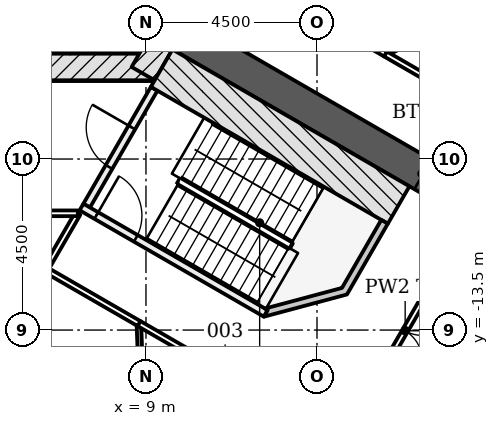
"""IFC4 building model, lengths in metres.
Left out: names, types, materials, properties, quantities, classifications, styles, units other than length and angle.
Written with IfcOpenShell. Run it as: python <this file> out.ifc"""

import sys

from ifc_helpers import new_model, si_unit, direction, frame, frame_2d, origin, place, context, subcontext, project, spatial, polyline, rectangle, outline, extrude, element, fill, save


model = new_model("IFC4")
c1 = context("Model", 3, precision=1e-05, world=origin(), true_north=direction((0.0, 1.0)))
c2 = subcontext(c1, "Body", "Model", "MODEL_VIEW")
j1 = project(units=[si_unit("LENGTHUNIT", "METRE"), si_unit("PLANEANGLEUNIT", "RADIAN")], contexts=[c1])
p1 = place(None, origin())
s1 = spatial("IfcSite", under=j1, at=p1, CompositionType="ELEMENT")
p2 = place(p1, origin())
s2 = spatial("IfcBuilding", under=s1, at=p2, CompositionType="ELEMENT")
p3 = place(p2, frame((0.0, 0.0, -9.0)))
s3 = spatial("IfcBuildingStorey", under=s2, at=p3, CompositionType="ELEMENT", Elevation=-9.0)
p4 = place(p3, frame((-9.229, -6.578, -0.3), z_axis=(0.0, 0.0, 1.0), x_axis=(1.0, 0.0, 0.0)))
e1 = element("IfcWall", 1, at=p4, inside=s3, PredefinedType="SHEAR", context=c2, shape_type="SweptSolid", body=[
    extrude(rectangle(XDim=18.458, YDim=0.7, at=frame_2d((9.229, 0.0))), origin(), (0.0, 0.0, 1.0), 4.5),
])
p5 = place(p3, frame((8.926, -6.753, -0.3), z_axis=(0.0, 0.0, 1.0), x_axis=(0.500042739161, 0.866000726912, 0.0)))
e2 = element("IfcWall", 2, at=p5, inside=s3, PredefinedType="SHEAR", context=c2, shape_type="SweptSolid", body=[
    extrude(rectangle(XDim=2.771, YDim=0.7, at=frame_2d((1.386, 0.0))), origin(), (0.0, 0.0, 1.0), 4.5),
])
p6 = place(p3, frame((9.922, -5.728, -0.3), z_axis=(0.0, 0.0, 1.0), x_axis=(0.866028046028, -0.499995423472, 0.0)))
e3 = element("IfcWall", 3, at=p6, inside=s3, PredefinedType="SHEAR", context=c2, shape_type="SweptSolid", body=[
    extrude(rectangle(XDim=14.633, YDim=0.9, at=frame_2d((7.316, 0.0))), origin(), (0.0, 0.0, 1.0), 4.5),
])
p7 = place(p6, frame((7.35, 0.0, 0.3)))
e4 = element("IfcOpeningElement", 4, at=p7, cuts=e3, PredefinedType="OPENING", context=c2, shape_type="SweptSolid", body=[
    extrude(rectangle(XDim=1.5, YDim=2.1, at=frame_2d((0.75, 1.05))), frame((0.0, 0.46, 0.0), z_axis=(0.0, -1.0, 0.0), x_axis=(1.0, 0.0, 0.0)), (0.0, 0.0, 1.0), 0.92),
])
p8 = place(p3, frame((7.07, -6.189, 0.0), z_axis=(0.0, 0.0, 1.0), x_axis=(-0.499997568964, 0.866026807339, 0.0)))
e5 = element("IfcWall", 5, at=p8, inside=s3, PredefinedType="PARTITIONING", context=c2, shape_type="SweptSolid", body=[
    extrude(rectangle(XDim=8.091, YDim=0.15, at=frame_2d((4.046, 0.0))), origin(), (0.0, 0.0, 1.0), 4.2),
])
p9 = place(p3, frame((7.44, -10.226, -0.3), z_axis=(0.0, 0.0, 1.0), x_axis=(0.500022077904, 0.866012656725, 0.0)))
e6 = element("IfcWall", 6, at=p9, inside=s3, PredefinedType="SHEAR", context=c2, shape_type="SweptSolid", body=[
    extrude(rectangle(XDim=3.55, YDim=0.2, at=frame_2d((1.775, 0.0))), origin(), (0.0, 0.0, 1.0), 4.5),
])
p10 = place(p9, frame((1.175, 0.0, 0.3)))
e7 = element("IfcOpeningElement", 7, at=p10, cuts=e6, PredefinedType="OPENING", context=c2, shape_type="SweptSolid", body=[
    extrude(rectangle(XDim=1.2, YDim=2.1, at=frame_2d((0.6, 1.05))), frame((0.0, 0.11, 0.0), z_axis=(0.0, -1.0, 0.0), x_axis=(1.0, 0.0, 0.0)), (0.0, 0.0, 1.0), 0.22),
])
p11 = place(p3, frame((7.304, -10.262, -0.3), z_axis=(0.0, 0.0, 1.0), x_axis=(0.866026594901, -0.49999793692, 0.0)))
e8 = element("IfcWall", 8, at=p11, inside=s3, PredefinedType="SHEAR", context=c2, shape_type="SweptSolid", body=[
    extrude(rectangle(XDim=5.6, YDim=0.2, at=frame_2d((2.8, 0.0))), origin(), (0.0, 0.0, 1.0), 4.5),
])
p12 = place(p11, frame((0.45, 0.0, 0.3)))
e9 = element("IfcOpeningElement", 9, at=p12, cuts=e8, PredefinedType="OPENING", context=c2, shape_type="SweptSolid", body=[
    extrude(rectangle(XDim=1.2, YDim=2.1, at=frame_2d((0.6, 1.05))), frame((0.0, 0.11, 0.0), z_axis=(0.0, -1.0, 0.0), x_axis=(1.0, 0.0, 0.0)), (0.0, 0.0, 1.0), 0.22),
])
p13 = place(p3, frame((9.413, -6.61, -0.3), z_axis=(0.0, 0.0, 1.0), x_axis=(0.866018442252, -0.500012057535, 0.0)))
e10 = element("IfcWall", 10, at=p13, inside=s3, PredefinedType="SHEAR", context=c2, shape_type="SweptSolid", body=[
    extrude(rectangle(XDim=7.2, YDim=1.136, at=frame_2d((3.6, 0.0))), origin(), (0.0, 0.0, 1.0), 4.5),
])
p14 = place(p3, frame((0.0, 0.0, -0.3)))
e11 = element("IfcWall", 11, at=p14, inside=s3, PredefinedType="SHEAR", context=c2, shape_type="SweptSolid", body=[
    extrude(outline(polyline([(12.104, -13.149), (14.289, -12.563), (15.364, -10.701), (15.191, -10.601), (14.157, -12.392), (12.132, -12.934), (12.204, -12.976), (12.204, -12.976), (12.204, -12.976), (12.204, -12.976), (12.204, -12.976), (12.204, -12.976), (12.204, -12.976), (12.204, -12.976), (12.204, -12.976), (12.204, -12.976), (12.204, -12.976), (12.204, -12.976), (12.204, -12.976), (12.204, -12.976), (12.204, -12.976), (12.204, -12.976), (12.204, -12.976), (12.104, -13.149)])), origin(), (0.0, 0.0, 1.0), 4.5),
])
p15 = place(p3, frame((8.813, -13.328, 0.0), z_axis=(0.0, 0.0, 1.0), x_axis=(0.03715191714, -0.999309629221, 0.0)))
e12 = element("IfcWall", 12, at=p15, inside=s3, PredefinedType="PARTITIONING", context=c2, shape_type="SweptSolid", body=[
    extrude(rectangle(XDim=4.442, YDim=0.12, at=frame_2d((2.221, 0.0))), origin(), (0.0, 0.0, 1.0), 3.588),
])
p16 = place(p3, frame((13.377, -15.963, 0.0), z_axis=(0.0, 0.0, 1.0), x_axis=(-0.865969754012, 0.500096375847, 0.0)))
e13 = element("IfcWall", 13, at=p16, inside=s3, PredefinedType="PARTITIONING", context=c2, shape_type="SweptSolid", body=[
    extrude(rectangle(XDim=5.275, YDim=0.15, at=frame_2d((2.637, 0.0))), origin(), (0.0, 0.0, 1.0), 3.588),
])
p17 = place(p16, frame((2.15, 0.0, 0.0)))
e14 = element("IfcOpeningElement", 14, at=p17, cuts=e13, PredefinedType="OPENING", context=c2, shape_type="SweptSolid", body=[
    extrude(rectangle(XDim=1.0, YDim=2.1, at=frame_2d((0.5, 1.05))), frame((0.0, 0.085, 0.0), z_axis=(0.0, -1.0, 0.0), x_axis=(1.0, 0.0, 0.0)), (0.0, 0.0, 1.0), 0.17),
])
p18 = place(p3, frame((17.491, -10.618, 0.0), z_axis=(0.0, 0.0, 1.0), x_axis=(-0.499969057507, -0.866043267704, 0.0)))
e15 = element("IfcWall", 15, at=p18, inside=s3, PredefinedType="PARTITIONING", context=c2, shape_type="SweptSolid", body=[
    extrude(rectangle(XDim=6.685, YDim=0.15, at=frame_2d((3.342, 0.0))), origin(), (0.0, 0.0, 1.0), 3.588),
])
p19 = place(p18, frame((2.45, 0.0, 0.0)))
e16 = element("IfcOpeningElement", 16, at=p19, cuts=e15, PredefinedType="OPENING", context=c2, shape_type="SweptSolid", body=[
    extrude(rectangle(XDim=1.8, YDim=2.1, at=frame_2d((0.9, 1.05))), frame((0.0, 0.085, 0.0), z_axis=(0.0, -1.0, 0.0), x_axis=(1.0, 0.0, 0.0)), (0.0, 0.0, 1.0), 0.17),
])
p20 = place(p3, frame((8.817, -13.33, 0.0), z_axis=(0.0, 0.0, 1.0), x_axis=(-0.865999736111, 0.50004445508, 0.0)))
e17 = element("IfcWall", 17, at=p20, inside=s3, PredefinedType="PARTITIONING", context=c2, shape_type="SweptSolid", body=[
    extrude(rectangle(XDim=2.844, YDim=0.15, at=frame_2d((1.422, 0.0))), origin(), (0.0, 0.0, 1.0), 3.588),
])
p21 = place(p3, frame((6.354, -11.906, 0.0), z_axis=(0.0, 0.0, 1.0), x_axis=(0.500539815233, 0.865713516913, 0.0)))
e18 = element("IfcWall", 18, at=p21, inside=s3, PredefinedType="PARTITIONING", context=c2, shape_type="SweptSolid", body=[
    extrude(rectangle(XDim=1.706, YDim=0.15, at=frame_2d((0.853, 0.0))), origin(), (0.0, 0.0, 1.0), 4.2),
])
p22 = place(p3, frame((7.208, -10.428, 0.0), z_axis=(0.0, 0.0, 1.0), x_axis=(-1.0, 0.0, 0.0)))
e19 = element("IfcWall", 19, at=p22, inside=s3, PredefinedType="PARTITIONING", context=c2, shape_type="SweptSolid", body=[
    extrude(rectangle(XDim=2.861, YDim=0.15, at=frame_2d((1.431, 0.0))), origin(), (0.0, 0.0, 1.0), 3.588),
])
p23 = place(p22, frame((0.95, 0.0, 0.0)))
e20 = element("IfcOpeningElement", 20, at=p23, cuts=e19, PredefinedType="OPENING", context=c2, shape_type="SweptSolid", body=[
    extrude(rectangle(XDim=1.0, YDim=2.1, at=frame_2d((0.5, 1.05))), frame((0.0, 0.085, 0.0), z_axis=(0.0, -1.0, 0.0), x_axis=(1.0, 0.0, 0.0)), (0.0, 0.0, 1.0), 0.17),
])
p24 = place(p3, frame((21.401, -3.15, 0.0), z_axis=(0.0, 0.0, 1.0), x_axis=(-0.892483368892, -0.451080299117, 0.0)))
e21 = element("IfcWall", 21, at=p24, inside=s3, PredefinedType="PARTITIONING", context=c2, shape_type="SweptSolid", body=[
    extrude(rectangle(XDim=6.837, YDim=0.12, at=frame_2d((3.418, 0.0))), origin(), (0.0, 0.0, 1.0), 3.588),
])
p25 = place(p3, frame((15.296, -6.233, 0.0), z_axis=(0.0, 0.0, 1.0), x_axis=(0.866035577775, -0.499982377718, 0.0)))
e22 = element("IfcWall", 22, at=p25, inside=s3, PredefinedType="PARTITIONING", context=c2, shape_type="SweptSolid", body=[
    extrude(rectangle(XDim=4.093, YDim=0.15, at=frame_2d((2.046, 0.0))), origin(), (0.0, 0.0, 1.0), 3.588),
])
p26 = place(p25, frame((1.15, 0.0, 0.0)))
e23 = element("IfcOpeningElement", 23, at=p26, cuts=e22, PredefinedType="OPENING", context=c2, shape_type="SweptSolid", body=[
    extrude(rectangle(XDim=1.8, YDim=2.1, at=frame_2d((0.9, 1.05))), frame((0.0, 0.085, 0.0), z_axis=(0.0, -1.0, 0.0), x_axis=(1.0, 0.0, 0.0)), (0.0, 0.0, 1.0), 0.17),
])
p27 = place(p3, frame((14.078, -5.529, 0.0), z_axis=(0.0, 0.0, 1.0), x_axis=(0.866110865696, -0.499851946404, 0.0)))
e24 = element("IfcWall", 24, at=p27, inside=s3, PredefinedType="PARTITIONING", context=c2, shape_type="SweptSolid", body=[
    extrude(rectangle(XDim=1.415, YDim=0.15, at=frame_2d((0.707, 0.0))), origin(), (0.0, 0.0, 1.0), 3.588),
])
p28 = place(p10, origin())
e25 = element("IfcDoor", 25, at=p28, inside=s3, OperationType="SINGLE_SWING_RIGHT", PredefinedType="DOOR", context=c2, shape_type="SweptSolid", body=[
    extrude(rectangle(XDim=1.2, YDim=2.1, at=frame_2d((0.6, 1.05))), frame((0.0, 0.025, 0.0), z_axis=(0.0, -1.0, 0.0), x_axis=(1.0, 0.0, 0.0)), (0.0, 0.0, 1.0), 0.05),
])
fill(e7, e25)
p29 = place(p12, origin())
e26 = element("IfcDoor", 26, at=p29, inside=s3, OperationType="SINGLE_SWING_LEFT", PredefinedType="DOOR", context=c2, shape_type="SweptSolid", body=[
    extrude(rectangle(XDim=1.2, YDim=2.1, at=frame_2d((0.6, 1.05))), frame((0.0, 0.025, 0.0), z_axis=(0.0, -1.0, 0.0), x_axis=(1.0, 0.0, 0.0)), (0.0, 0.0, 1.0), 0.05),
])
fill(e9, e26)
p30 = place(p19, origin())
e27 = element("IfcDoor", 27, at=p30, inside=s3, OperationType="DOUBLE_DOOR_SINGLE_SWING", PredefinedType="DOOR", context=c2, shape_type="SweptSolid", body=[
    extrude(rectangle(XDim=1.8, YDim=2.1, at=frame_2d((0.9, 1.05))), frame((0.0, 0.025, 0.0), z_axis=(0.0, -1.0, 0.0), x_axis=(1.0, 0.0, 0.0)), (0.0, 0.0, 1.0), 0.05),
])
fill(e16, e27)
save(model, sys.argv[1])
